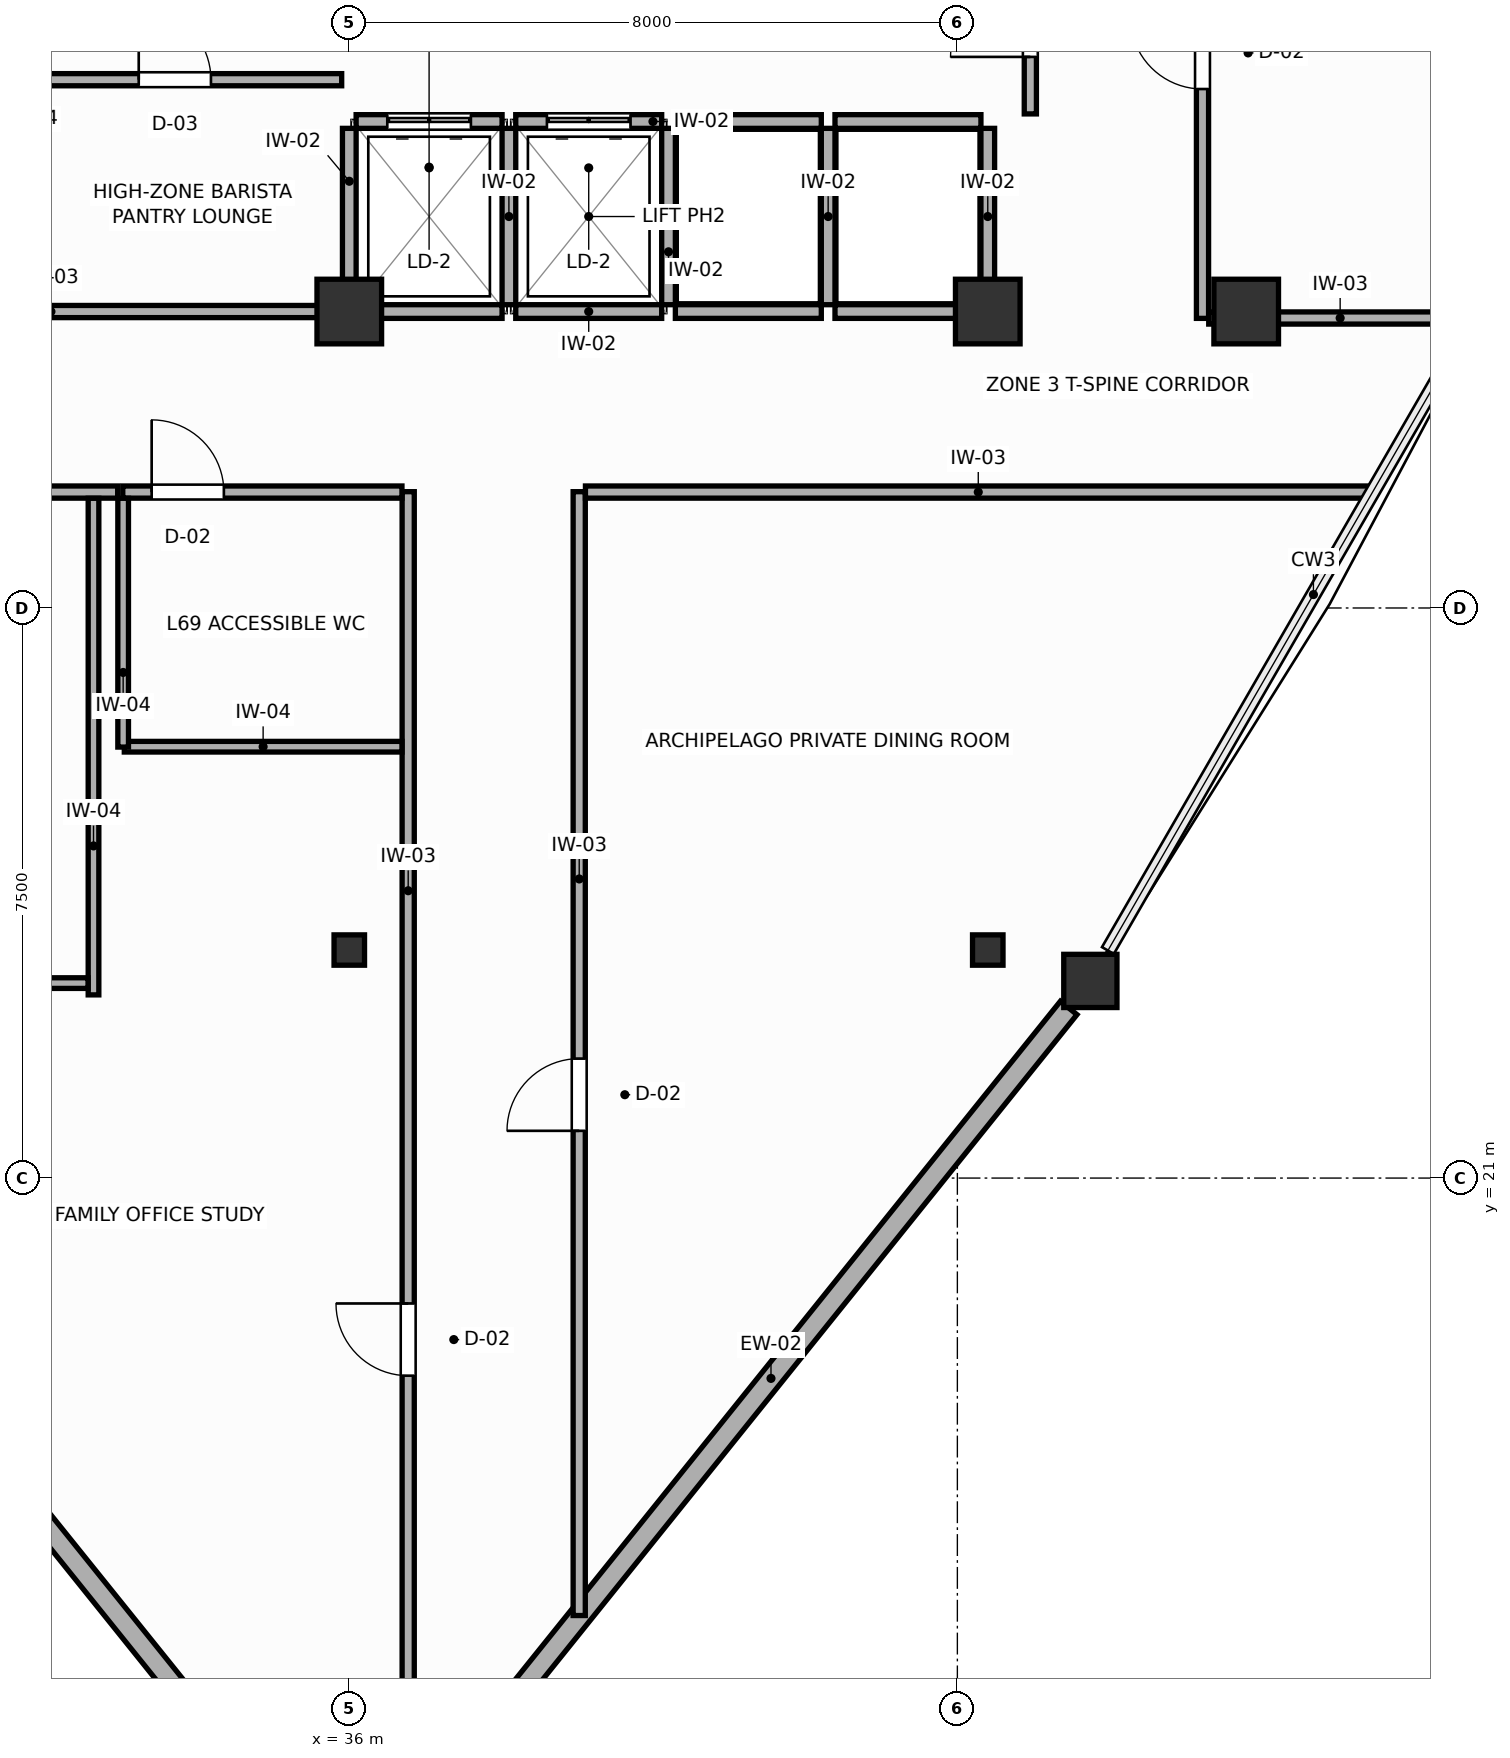
"""IFC4 building model, lengths in metres.
Left out: names, types, materials, properties, quantities, classifications, styles, units other than length and angle.
Written with IfcOpenShell. Run it as: python <this file> out.ifc"""

import sys

from ifc_helpers import new_model, si_unit, direction, frame, frame_2d, origin, origin_2d, place, context, subcontext, project, spatial, rectangle, i_section, extrude, source, transform, mapped, element, fill, save


model = new_model("IFC4")
c1 = context("Model", 3, precision=1e-05, world=origin(), true_north=direction((0.0, 1.0)))
c2 = subcontext(c1, "Body", "Model", "MODEL_VIEW")
j1 = project(units=[si_unit("LENGTHUNIT", "METRE"), si_unit("PLANEANGLEUNIT", "RADIAN")], contexts=[c1])
p1 = place(None, origin())
s1 = spatial("IfcSite", under=j1, at=p1, CompositionType="ELEMENT")
p2 = place(p1, origin())
s2 = spatial("IfcBuilding", under=s1, at=p2, CompositionType="ELEMENT")
p3 = place(p2, frame((0.0, 0.0, 264.6)))
s3 = spatial("IfcBuildingStorey", under=s2, at=p3, CompositionType="ELEMENT", Elevation=264.6)
m1 = source(origin(), c2, "Body", "SweptSolid", [
    extrude(rectangle(XDim=0.85, YDim=0.85, at=origin_2d()), origin(), (0.0, 0.0, 1.0), 3.6),
])
for number, where, z_axis, x_axis in (
    (1, (44.4, 32.4, 0.0), (0.0, 0.0, 1.0), (1.0, 0.0, 0.0)),
    (2, (36.0, 32.4, 0.0), (0.0, 0.0, 1.0), (1.0, 0.0, 0.0)),
    (3, (47.8, 32.4, 0.0), (0.0, 0.0, 1.0), (1.0, 0.0, 0.0)),
):
    element("IfcColumn", number, at=place(p3, frame(where, z_axis=z_axis, x_axis=x_axis)), inside=s3, PredefinedType="COLUMN", context=c2, shape_type="MappedRepresentation", body=[
        mapped(m1, transform((0.0, 0.0, 0.0), scale=1.0)),
    ])
m2 = source(origin(), c2, "Body", "SweptSolid", [
    extrude(i_section(OverallWidth=0.401, OverallDepth=0.399, WebThickness=0.022, FlangeThickness=0.036, FilletRadius=0.015, at=origin_2d()), origin(), (0.0, 0.0, 1.0), 3.6),
])
for number, where, z_axis, x_axis in (
    (4, (44.4, 24.0, 0.0), (0.0, 0.0, 1.0), (1.0, 0.0, 0.0)),
    (5, (36.0, 24.0, 0.0), (0.0, 0.0, 1.0), (1.0, 0.0, 0.0)),
):
    element("IfcColumn", number, at=place(p3, frame(where, z_axis=z_axis, x_axis=x_axis)), inside=s3, PredefinedType="COLUMN", context=c2, shape_type="MappedRepresentation", body=[
        mapped(m2, transform((0.0, 0.0, 0.0), scale=1.0)),
    ])
m3 = source(origin(), c2, "Body", "SweptSolid", [
    extrude(rectangle(XDim=0.7, YDim=0.7, at=origin_2d()), origin(), (0.0, 0.0, 1.0), 3.6),
])
p4 = place(p3, frame((45.75, 23.594, 0.0), z_axis=(0.0, 0.0, 1.0), x_axis=(1.0, 0.0, 0.0)))
e6 = element("IfcColumn", 6, at=p4, inside=s3, PredefinedType="COLUMN", context=c2, shape_type="MappedRepresentation", body=[
    mapped(m3, transform((0.0, 0.0, 0.0), scale=1.0)),
])
p5 = place(p3, frame((26.536, 23.239, 0.0), z_axis=(0.0, 0.0, 1.0), x_axis=(0.626367381926, -0.779528000048, 0.0)))
e7 = element("IfcWall", 7, at=p5, inside=s3, PredefinedType="SOLIDWALL", context=c2, shape_type="SweptSolid", body=[
    extrude(rectangle(XDim=12.505, YDim=0.28, at=frame_2d((6.252, 0.0))), origin(), (0.0, 0.0, 1.0), 3.08),
])
p6 = place(p3, frame((37.632, 13.49, 0.0), z_axis=(0.0, 0.0, 1.0), x_axis=(0.626367381926, 0.779528000048, 0.0)))
e8 = element("IfcWall", 8, at=p6, inside=s3, PredefinedType="SOLIDWALL", context=c2, shape_type="SweptSolid", body=[
    extrude(rectangle(XDim=12.505, YDim=0.28, at=frame_2d((6.252, 0.0))), origin(), (0.0, 0.0, 1.0), 3.05),
])
p7 = place(p3, frame((36.09, 34.9, 0.0), z_axis=(0.0, 0.0, 1.0), x_axis=(1.0, 0.0, 0.0)))
e9 = element("IfcWall", 9, at=p7, inside=s3, PredefinedType="PARTITIONING", context=c2, shape_type="SweptSolid", body=[
    extrude(rectangle(XDim=1.92, YDim=0.18, at=frame_2d((0.96, 0.0))), origin(), (0.0, 0.0, 1.0), 3.41),
])
p8 = place(p7, frame((0.41, 0.0, 0.0)))
e10 = element("IfcOpeningElement", 10, at=p8, cuts=e9, PredefinedType="OPENING", context=c2, shape_type="SweptSolid", body=[
    extrude(rectangle(XDim=1.1, YDim=2.1, at=frame_2d((0.55, 1.05))), frame((0.0, 0.1, 0.0), z_axis=(0.0, -1.0, 0.0), x_axis=(1.0, 0.0, 0.0)), (0.0, 0.0, 1.0), 0.2),
])
p9 = place(p3, frame((36.09, 32.4, 0.0), z_axis=(0.0, 0.0, 1.0), x_axis=(1.0, 0.0, 0.0)))
e11 = element("IfcWall", 11, at=p9, inside=s3, PredefinedType="PARTITIONING", context=c2, shape_type="SweptSolid", body=[
    extrude(rectangle(XDim=1.92, YDim=0.18, at=frame_2d((0.96, 0.0))), origin(), (0.0, 0.0, 1.0), 3.08),
])
p10 = place(p3, frame((36.0, 32.49, 0.0), z_axis=(0.0, 0.0, 1.0), x_axis=(0.0, 1.0, 0.0)))
e12 = element("IfcWall", 12, at=p10, inside=s3, PredefinedType="PARTITIONING", context=c2, shape_type="SweptSolid", body=[
    extrude(rectangle(XDim=2.32, YDim=0.18, at=frame_2d((1.16, 0.0))), origin(), (0.0, 0.0, 1.0), 3.41),
])
p11 = place(p3, frame((38.19, 34.9, 0.0), z_axis=(0.0, 0.0, 1.0), x_axis=(1.0, 0.0, 0.0)))
e13 = element("IfcWall", 13, at=p11, inside=s3, PredefinedType="PARTITIONING", context=c2, shape_type="SweptSolid", body=[
    extrude(rectangle(XDim=1.92, YDim=0.18, at=frame_2d((0.96, 0.0))), origin(), (0.0, 0.0, 1.0), 3.41),
])
p12 = place(p11, frame((0.41, 0.0, 0.0)))
e14 = element("IfcOpeningElement", 14, at=p12, cuts=e13, PredefinedType="OPENING", context=c2, shape_type="SweptSolid", body=[
    extrude(rectangle(XDim=1.1, YDim=2.1, at=frame_2d((0.55, 1.05))), frame((0.0, 0.1, 0.0), z_axis=(0.0, -1.0, 0.0), x_axis=(1.0, 0.0, 0.0)), (0.0, 0.0, 1.0), 0.2),
])
p13 = place(p3, frame((38.19, 32.4, 0.0), z_axis=(0.0, 0.0, 1.0), x_axis=(1.0, 0.0, 0.0)))
e15 = element("IfcWall", 15, at=p13, inside=s3, PredefinedType="PARTITIONING", context=c2, shape_type="SweptSolid", body=[
    extrude(rectangle(XDim=1.92, YDim=0.18, at=frame_2d((0.96, 0.0))), origin(), (0.0, 0.0, 1.0), 3.08),
])
p14 = place(p3, frame((38.1, 32.49, 0.0), z_axis=(0.0, 0.0, 1.0), x_axis=(0.0, 1.0, 0.0)))
e16 = element("IfcWall", 16, at=p14, inside=s3, PredefinedType="PARTITIONING", context=c2, shape_type="SweptSolid", body=[
    extrude(rectangle(XDim=2.32, YDim=0.18, at=frame_2d((1.16, 0.0))), origin(), (0.0, 0.0, 1.0), 3.41),
])
p15 = place(p3, frame((40.29, 34.9, 0.0), z_axis=(0.0, 0.0, 1.0), x_axis=(1.0, 0.0, 0.0)))
e17 = element("IfcWall", 17, at=p15, inside=s3, PredefinedType="PARTITIONING", context=c2, shape_type="SweptSolid", body=[
    extrude(rectangle(XDim=1.92, YDim=0.18, at=frame_2d((0.96, 0.0))), origin(), (0.0, 0.0, 1.0), 3.41),
])
p16 = place(p3, frame((40.29, 32.4, 0.0), z_axis=(0.0, 0.0, 1.0), x_axis=(1.0, 0.0, 0.0)))
e18 = element("IfcWall", 18, at=p16, inside=s3, PredefinedType="PARTITIONING", context=c2, shape_type="SweptSolid", body=[
    extrude(rectangle(XDim=1.92, YDim=0.18, at=frame_2d((0.96, 0.0))), origin(), (0.0, 0.0, 1.0), 3.08),
])
p17 = place(p3, frame((40.2, 32.49, 0.0), z_axis=(0.0, 0.0, 1.0), x_axis=(0.0, 1.0, 0.0)))
e19 = element("IfcWall", 19, at=p17, inside=s3, PredefinedType="PARTITIONING", context=c2, shape_type="SweptSolid", body=[
    extrude(rectangle(XDim=2.32, YDim=0.18, at=frame_2d((1.16, 0.0))), origin(), (0.0, 0.0, 1.0), 3.41),
])
p18 = place(p3, frame((42.39, 34.9, 0.0), z_axis=(0.0, 0.0, 1.0), x_axis=(1.0, 0.0, 0.0)))
e20 = element("IfcWall", 20, at=p18, inside=s3, PredefinedType="PARTITIONING", context=c2, shape_type="SweptSolid", body=[
    extrude(rectangle(XDim=1.92, YDim=0.18, at=frame_2d((0.96, 0.0))), origin(), (0.0, 0.0, 1.0), 3.41),
])
p19 = place(p3, frame((42.39, 32.4, 0.0), z_axis=(0.0, 0.0, 1.0), x_axis=(1.0, 0.0, 0.0)))
e21 = element("IfcWall", 21, at=p19, inside=s3, PredefinedType="PARTITIONING", context=c2, shape_type="SweptSolid", body=[
    extrude(rectangle(XDim=1.92, YDim=0.18, at=frame_2d((0.96, 0.0))), origin(), (0.0, 0.0, 1.0), 3.08),
])
for number, where, z_axis, x_axis in (
    (22, (42.3, 32.49, 0.0), (0.0, 0.0, 1.0), (0.0, 1.0, 0.0)),
    (23, (44.4, 32.49, 0.0), (0.0, 0.0, 1.0), (0.0, 1.0, 0.0)),
):
    element("IfcWall", number, at=place(p3, frame(where, z_axis=z_axis, x_axis=x_axis)), inside=s3, PredefinedType="PARTITIONING", context=c2, shape_type="SweptSolid", body=[
        extrude(rectangle(XDim=2.32, YDim=0.18, at=frame_2d((1.16, 0.0))), origin(), (0.0, 0.0, 1.0), 3.41),
    ])
p20 = place(p3, frame((28.25, 32.4, 0.0), z_axis=(0.0, 0.0, 1.0), x_axis=(1.0, 0.0, 0.0)))
e24 = element("IfcWall", 24, at=p20, inside=s3, PredefinedType="PARTITIONING", context=c2, shape_type="SweptSolid", body=[
    extrude(rectangle(XDim=7.65, YDim=0.16, at=frame_2d((3.825, 0.0))), origin(), (0.0, 0.0, 1.0), 3.08),
])
p21 = place(p3, frame((31.88, 35.45, 0.0), z_axis=(0.0, 0.0, 1.0), x_axis=(1.0, 0.0, 0.0)))
e25 = element("IfcWall", 25, at=p21, inside=s3, PredefinedType="PARTITIONING", context=c2, shape_type="SweptSolid", body=[
    extrude(rectangle(XDim=4.02, YDim=0.16, at=frame_2d((2.01, 0.0))), origin(), (0.0, 0.0, 1.0), 3.41),
])
p22 = place(p21, frame((1.35, 0.0, 0.0)))
e26 = element("IfcOpeningElement", 26, at=p22, cuts=e25, PredefinedType="OPENING", context=c2, shape_type="SweptSolid", body=[
    extrude(rectangle(XDim=0.95, YDim=2.05, at=frame_2d((0.475, 1.025))), frame((0.0, 0.09, 0.0), z_axis=(0.0, -1.0, 0.0), x_axis=(1.0, 0.0, 0.0)), (0.0, 0.0, 1.0), 0.18),
])
p23 = place(p3, frame((44.96, 35.0, 0.0), z_axis=(0.0, 0.0, 1.0), x_axis=(0.0, 1.0, 0.0)))
e27 = element("IfcWall", 27, at=p23, inside=s3, PredefinedType="PARTITIONING", context=c2, shape_type="SweptSolid", body=[
    extrude(rectangle(XDim=2.65, YDim=0.16, at=frame_2d((1.325, 0.0))), origin(), (0.0, 0.0, 1.0), 3.41),
])
p24 = place(p23, frame((0.75, 0.0, 0.0)))
e28 = element("IfcOpeningElement", 28, at=p24, cuts=e27, PredefinedType="OPENING", context=c2, shape_type="SweptSolid", body=[
    extrude(rectangle(XDim=1.05, YDim=2.1, at=frame_2d((0.525, 1.05))), frame((0.0, 0.09, 0.0), z_axis=(0.0, -1.0, 0.0), x_axis=(1.0, 0.0, 0.0)), (0.0, 0.0, 1.0), 0.18),
])
p25 = place(p3, frame((47.225, 32.31, 0.0), z_axis=(0.0, 0.0, 1.0), x_axis=(0.0, 1.0, 0.0)))
e29 = element("IfcWall", 29, at=p25, inside=s3, PredefinedType="PARTITIONING", context=c2, shape_type="SweptSolid", body=[
    extrude(rectangle(XDim=17.489, YDim=0.16, at=frame_2d((8.745, 0.0))), origin(), (0.0, 0.0, 1.0), 3.41),
])
p26 = place(p25, frame((3.018, 0.0, 0.0)))
e30 = element("IfcOpeningElement", 30, at=p26, cuts=e29, PredefinedType="OPENING", context=c2, shape_type="SweptSolid", body=[
    extrude(rectangle(XDim=0.95, YDim=2.05, at=frame_2d((0.475, 1.025))), frame((0.0, 0.09, 0.0), z_axis=(0.0, -1.0, 0.0), x_axis=(1.0, 0.0, 0.0)), (0.0, 0.0, 1.0), 0.18),
])
p27 = place(p25, frame((11.541, 0.0, 0.0)))
e31 = element("IfcOpeningElement", 31, at=p27, cuts=e29, PredefinedType="OPENING", context=c2, shape_type="SweptSolid", body=[
    extrude(rectangle(XDim=0.95, YDim=2.05, at=frame_2d((0.475, 1.025))), frame((0.0, 0.09, 0.0), z_axis=(0.0, -1.0, 0.0), x_axis=(1.0, 0.0, 0.0)), (0.0, 0.0, 1.0), 0.18),
])
p28 = place(p3, frame((36.775, 13.156, 0.0), z_axis=(0.0, 0.0, 1.0), x_axis=(0.0, 1.0, 0.0)))
e32 = element("IfcWall", 32, at=p28, inside=s3, PredefinedType="PARTITIONING", context=c2, shape_type="SweptSolid", body=[
    extrude(rectangle(XDim=16.875, YDim=0.16, at=frame_2d((8.437, 0.0))), origin(), (0.0, 0.0, 1.0), 3.08),
])
p29 = place(p28, frame((5.245, 0.0, 0.0)))
e33 = element("IfcOpeningElement", 33, at=p29, cuts=e32, PredefinedType="OPENING", context=c2, shape_type="SweptSolid", body=[
    extrude(rectangle(XDim=0.95, YDim=2.05, at=frame_2d((0.475, 1.025))), frame((0.0, 0.09, 0.0), z_axis=(0.0, -1.0, 0.0), x_axis=(1.0, 0.0, 0.0)), (0.0, 0.0, 1.0), 0.18),
])
p30 = place(p3, frame((39.025, 15.245, 0.0), z_axis=(0.0, 0.0, 1.0), x_axis=(0.0, 1.0, 0.0)))
e34 = element("IfcWall", 34, at=p30, inside=s3, PredefinedType="PARTITIONING", context=c2, shape_type="SweptSolid", body=[
    extrude(rectangle(XDim=14.785, YDim=0.16, at=frame_2d((7.393, 0.0))), origin(), (0.0, 0.0, 1.0), 3.41),
])
p31 = place(p30, frame((6.377, 0.0, 0.0)))
e35 = element("IfcOpeningElement", 35, at=p31, cuts=e34, PredefinedType="OPENING", context=c2, shape_type="SweptSolid", body=[
    extrude(rectangle(XDim=0.95, YDim=2.05, at=frame_2d((0.475, 1.025))), frame((0.0, 0.09, 0.0), z_axis=(0.0, -1.0, 0.0), x_axis=(1.0, 0.0, 0.0)), (0.0, 0.0, 1.0), 0.18),
])
p32 = place(p3, frame((39.107, 30.025, 0.0), z_axis=(0.0, 0.0, 1.0), x_axis=(1.0, 0.0, 0.0)))
e36 = element("IfcWall", 36, at=p32, inside=s3, PredefinedType="PARTITIONING", context=c2, shape_type="SweptSolid", body=[
    extrude(rectangle(XDim=10.336, YDim=0.16, at=frame_2d((5.168, 0.0))), origin(), (0.0, 0.0, 1.0), 3.41),
])
p33 = place(p3, frame((22.557, 30.025, 0.0), z_axis=(0.0, 0.0, 1.0), x_axis=(1.0, 0.0, 0.0)))
e37 = element("IfcWall", 37, at=p33, inside=s3, PredefinedType="PARTITIONING", context=c2, shape_type="SweptSolid", body=[
    extrude(rectangle(XDim=10.396, YDim=0.16, at=frame_2d((5.198, 0.0))), origin(), (0.0, 0.0, 1.0), 3.41),
])
p34 = place(p33, frame((7.166, 0.0, 0.0)))
e38 = element("IfcOpeningElement", 38, at=p34, cuts=e37, PredefinedType="OPENING", context=c2, shape_type="SweptSolid", body=[
    extrude(rectangle(XDim=0.95, YDim=2.05, at=frame_2d((0.475, 1.025))), frame((0.0, 0.09, 0.0), z_axis=(0.0, -1.0, 0.0), x_axis=(1.0, 0.0, 0.0)), (0.0, 0.0, 1.0), 0.18),
])
p35 = place(p3, frame((33.02, 30.025, 0.0), z_axis=(0.0, 0.0, 1.0), x_axis=(1.0, 0.0, 0.0)))
e39 = element("IfcWall", 39, at=p35, inside=s3, PredefinedType="PARTITIONING", context=c2, shape_type="SweptSolid", body=[
    extrude(rectangle(XDim=3.673, YDim=0.16, at=frame_2d((1.836, 0.0))), origin(), (0.0, 0.0, 1.0), 3.41),
])
p36 = place(p35, frame((0.38, 0.0, 0.0)))
e40 = element("IfcOpeningElement", 40, at=p36, cuts=e39, PredefinedType="OPENING", context=c2, shape_type="SweptSolid", body=[
    extrude(rectangle(XDim=0.95, YDim=2.05, at=frame_2d((0.475, 1.025))), frame((0.0, 0.09, 0.0), z_axis=(0.0, -1.0, 0.0), x_axis=(1.0, 0.0, 0.0)), (0.0, 0.0, 1.0), 0.18),
])
p37 = place(p3, frame((47.307, 32.315, 0.0), z_axis=(0.0, 0.0, 1.0), x_axis=(1.0, 0.0, 0.0)))
e41 = element("IfcWall", 41, at=p37, inside=s3, PredefinedType="PARTITIONING", context=c2, shape_type="SweptSolid", body=[
    extrude(rectangle(XDim=3.458, YDim=0.16, at=frame_2d((1.729, 0.0))), origin(), (0.0, 0.0, 1.0), 3.08),
])
p38 = place(p3, frame((32.635, 23.41, 0.0), z_axis=(0.0, 0.0, 1.0), x_axis=(0.0, 1.0, 0.0)))
e42 = element("IfcWall", 42, at=p38, inside=s3, PredefinedType="PARTITIONING", context=c2, shape_type="SweptSolid", body=[
    extrude(rectangle(XDim=6.533, YDim=0.14, at=frame_2d((3.267, 0.0))), origin(), (0.0, 0.0, 1.0), 3.41),
])
p39 = place(p3, frame((26.293, 23.565, 0.0), z_axis=(0.0, 0.0, 1.0), x_axis=(1.0, 0.0, 0.0)))
e43 = element("IfcWall", 43, at=p39, inside=s3, PredefinedType="PARTITIONING", context=c2, shape_type="SweptSolid", body=[
    extrude(rectangle(XDim=6.27, YDim=0.14, at=frame_2d((3.135, 0.0))), origin(), (0.0, 0.0, 1.0), 3.08),
])
p40 = place(p3, frame((33.04, 26.675, 0.0), z_axis=(0.0, 0.0, 1.0), x_axis=(1.0, 0.0, 0.0)))
e44 = element("IfcWall", 44, at=p40, inside=s3, PredefinedType="PARTITIONING", context=c2, shape_type="SweptSolid", body=[
    extrude(rectangle(XDim=3.653, YDim=0.14, at=frame_2d((1.827, 0.0))), origin(), (0.0, 0.0, 1.0), 3.41),
])
p41 = place(p3, frame((33.025, 26.67, 0.0), z_axis=(0.0, 0.0, 1.0), x_axis=(0.0, 1.0, 0.0)))
e45 = element("IfcWall", 45, at=p41, inside=s3, PredefinedType="PARTITIONING", context=c2, shape_type="SweptSolid", body=[
    extrude(rectangle(XDim=3.273, YDim=0.14, at=frame_2d((1.637, 0.0))), origin(), (0.0, 0.0, 1.0), 3.41),
])
p42 = place(p8, origin())
e46 = element("IfcDoor", 46, at=p42, inside=s3, OperationType="DOUBLE_DOOR_SLIDING", PredefinedType="DOOR", context=c2, shape_type="SweptSolid", body=[
    extrude(rectangle(XDim=1.1, YDim=2.1, at=frame_2d((0.55, 1.05))), frame((0.0, 0.025, 0.0), z_axis=(0.0, -1.0, 0.0), x_axis=(1.0, 0.0, 0.0)), (0.0, 0.0, 1.0), 0.05),
])
fill(e10, e46)
p43 = place(p12, origin())
e47 = element("IfcDoor", 47, at=p43, inside=s3, OperationType="DOUBLE_DOOR_SLIDING", PredefinedType="DOOR", context=c2, shape_type="SweptSolid", body=[
    extrude(rectangle(XDim=1.1, YDim=2.1, at=frame_2d((0.55, 1.05))), frame((0.0, 0.025, 0.0), z_axis=(0.0, -1.0, 0.0), x_axis=(1.0, 0.0, 0.0)), (0.0, 0.0, 1.0), 0.05),
])
fill(e14, e47)
p44 = place(p22, origin())
e48 = element("IfcDoor", 48, at=p44, inside=s3, OperationType="SINGLE_SWING_LEFT", PredefinedType="DOOR", context=c2, shape_type="SweptSolid", body=[
    extrude(rectangle(XDim=0.95, YDim=2.05, at=frame_2d((0.475, 1.025))), frame((0.0, 0.025, 0.0), z_axis=(0.0, -1.0, 0.0), x_axis=(1.0, 0.0, 0.0)), (0.0, 0.0, 1.0), 0.05),
])
fill(e26, e48)
p45 = place(p24, origin())
e49 = element("IfcDoor", 49, at=p45, inside=s3, OperationType="SINGLE_SWING_LEFT", PredefinedType="DOOR", context=c2, shape_type="SweptSolid", body=[
    extrude(rectangle(XDim=1.05, YDim=2.1, at=frame_2d((0.525, 1.05))), frame((0.0, 0.025, 0.0), z_axis=(0.0, -1.0, 0.0), x_axis=(1.0, 0.0, 0.0)), (0.0, 0.0, 1.0), 0.05),
])
fill(e28, e49)
p46 = place(p26, origin())
e50 = element("IfcDoor", 50, at=p46, inside=s3, OperationType="SINGLE_SWING_RIGHT", PredefinedType="DOOR", context=c2, shape_type="SweptSolid", body=[
    extrude(rectangle(XDim=0.95, YDim=2.05, at=frame_2d((0.475, 1.025))), frame((0.0, 0.025, 0.0), z_axis=(0.0, -1.0, 0.0), x_axis=(1.0, 0.0, 0.0)), (0.0, 0.0, 1.0), 0.05),
])
fill(e30, e50)
p47 = place(p29, origin())
e51 = element("IfcDoor", 51, at=p47, inside=s3, OperationType="SINGLE_SWING_RIGHT", PredefinedType="DOOR", context=c2, shape_type="SweptSolid", body=[
    extrude(rectangle(XDim=0.95, YDim=2.05, at=frame_2d((0.475, 1.025))), frame((0.0, 0.025, 0.0), z_axis=(0.0, -1.0, 0.0), x_axis=(1.0, 0.0, 0.0)), (0.0, 0.0, 1.0), 0.05),
])
fill(e33, e51)
p48 = place(p31, origin())
e52 = element("IfcDoor", 52, at=p48, inside=s3, OperationType="SINGLE_SWING_LEFT", PredefinedType="DOOR", context=c2, shape_type="SweptSolid", body=[
    extrude(rectangle(XDim=0.95, YDim=2.05, at=frame_2d((0.475, 1.025))), frame((0.0, 0.025, 0.0), z_axis=(0.0, -1.0, 0.0), x_axis=(1.0, 0.0, 0.0)), (0.0, 0.0, 1.0), 0.05),
])
fill(e35, e52)
p49 = place(p36, origin())
e53 = element("IfcDoor", 53, at=p49, inside=s3, OperationType="SINGLE_SWING_LEFT", PredefinedType="DOOR", context=c2, shape_type="SweptSolid", body=[
    extrude(rectangle(XDim=0.95, YDim=2.05, at=frame_2d((0.475, 1.025))), frame((0.0, 0.025, 0.0), z_axis=(0.0, -1.0, 0.0), x_axis=(1.0, 0.0, 0.0)), (0.0, 0.0, 1.0), 0.05),
])
fill(e40, e53)
save(model, sys.argv[1])
